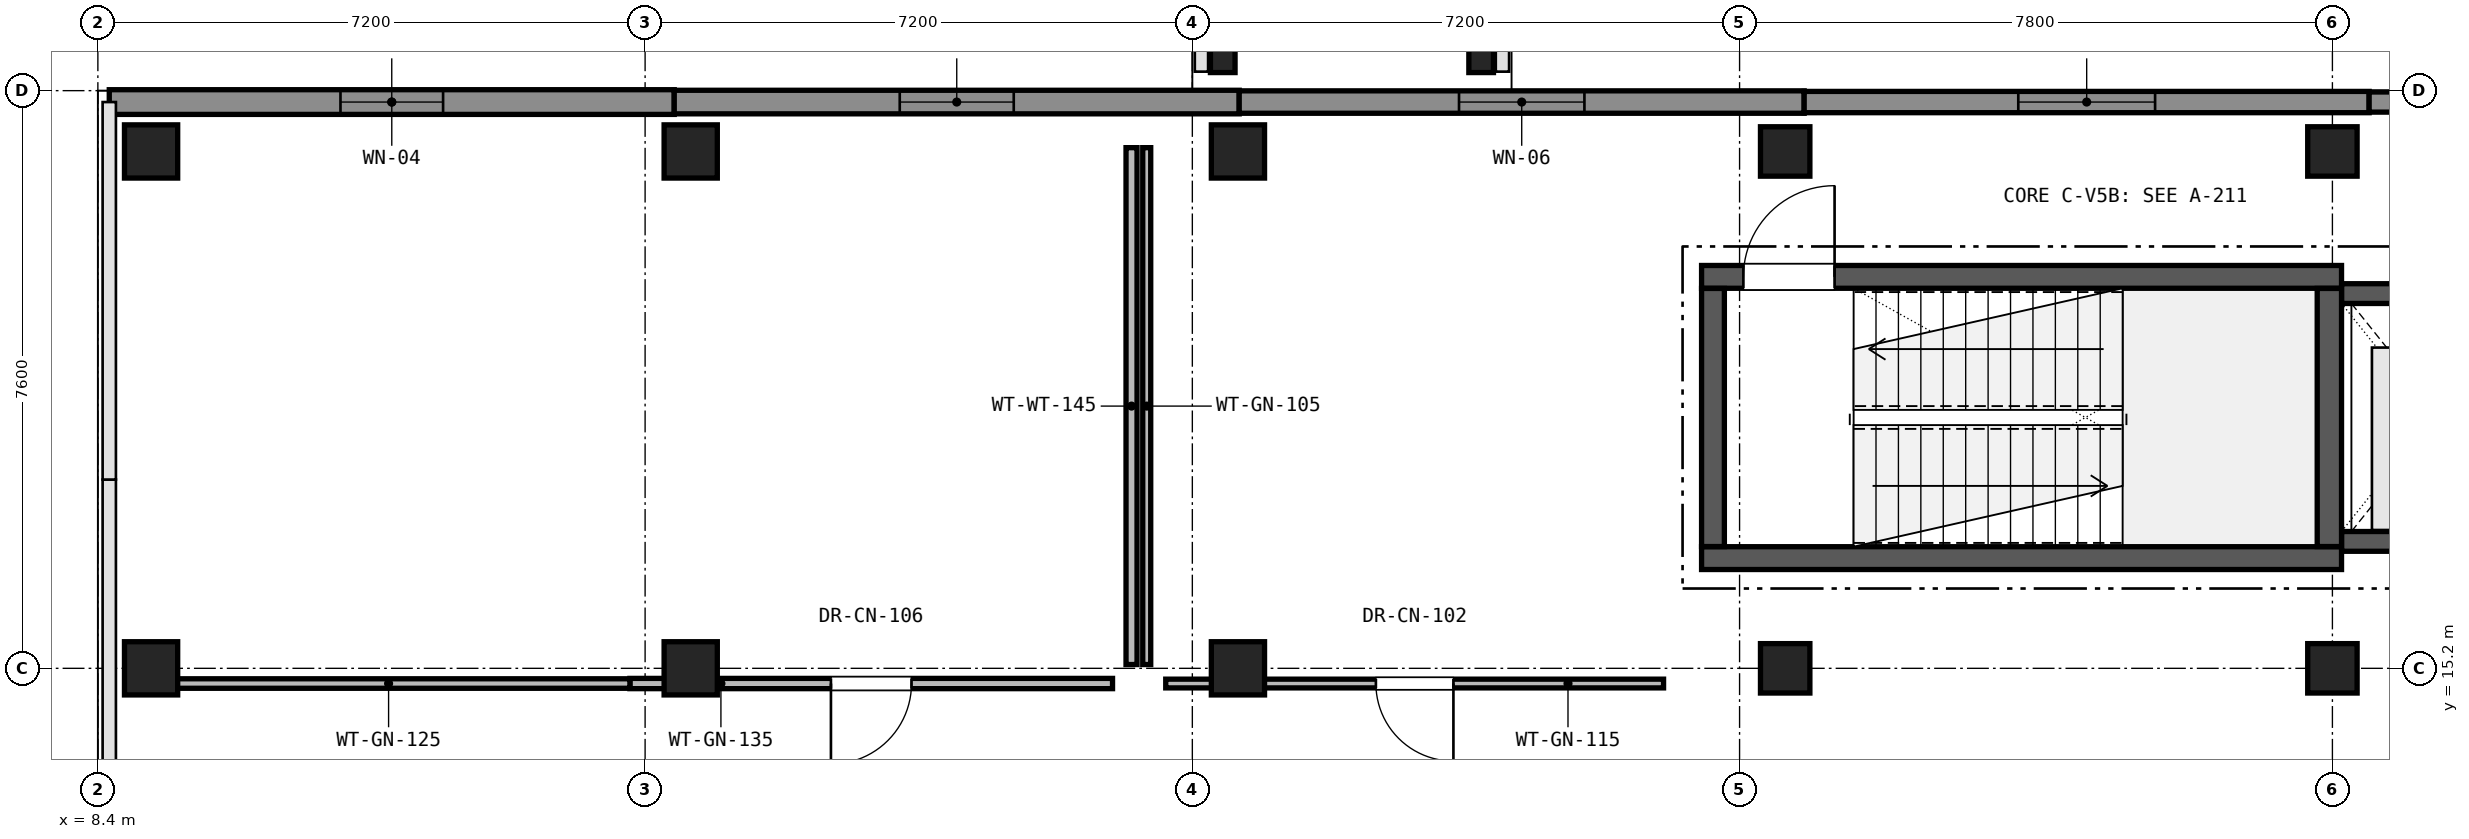
"""IFC4 building model, lengths in metres.
Left out: names, types, materials, properties, quantities, classifications, styles, units other than length and angle.
Written with IfcOpenShell. Run it as: python <this file> out.ifc"""

import sys

from ifc_helpers import new_model, si_unit, direction, frame, frame_2d, origin, origin_2d, place, context, subcontext, project, spatial, rectangle, hollow_circle, extrude, element, fill, save


model = new_model("IFC4")
c1 = context("Model", 3, precision=1e-05, world=origin(), true_north=direction((0.0, 1.0)))
c2 = subcontext(c1, "Body", "Model", "MODEL_VIEW")
j1 = project(units=[si_unit("LENGTHUNIT", "METRE"), si_unit("PLANEANGLEUNIT", "RADIAN")], contexts=[c1])
p1 = place(None, origin())
s1 = spatial("IfcSite", under=j1, at=p1, CompositionType="ELEMENT")
p2 = place(p1, origin())
s2 = spatial("IfcBuilding", under=s1, at=p2, CompositionType="ELEMENT")
p3 = place(p2, frame((0.0, 0.0, 5.1)))
s3 = spatial("IfcBuildingStorey", under=s2, at=p3, CompositionType="ELEMENT", Elevation=5.1)
for number, where, z_axis, x_axis in (
    (1, (9.1, 15.2, 0.0), (0.0, 0.0, 1.0), (1.0, 0.0, 0.0)),
    (2, (9.1, 22.0, 0.0), (0.0, 0.0, 1.0), (1.0, 0.0, 0.0)),
    (3, (16.2, 15.2, 0.0), (0.0, 0.0, 1.0), (1.0, 0.0, 0.0)),
    (4, (16.2, 22.0, 0.0), (0.0, 0.0, 1.0), (1.0, 0.0, 0.0)),
    (5, (23.4, 15.2, 0.0), (0.0, 0.0, 1.0), (1.0, 0.0, 0.0)),
    (6, (23.4, 22.0, 0.0), (0.0, 0.0, 1.0), (1.0, 0.0, 0.0)),
):
    element("IfcColumn", number, at=place(p3, frame(where, z_axis=z_axis, x_axis=x_axis)), inside=s3, PredefinedType="COLUMN", context=c2, shape_type="SweptSolid", body=[
        extrude(rectangle(XDim=0.7, YDim=0.7, at=origin_2d()), origin(), (0.0, 0.0, 1.0), 4.42),
    ])
for number, where, z_axis, x_axis in (
    (7, (30.6, 15.2, 0.0), (0.0, 0.0, 1.0), (1.0, 0.0, 0.0)),
    (8, (30.6, 22.0, 0.0), (0.0, 0.0, 1.0), (1.0, 0.0, 0.0)),
    (9, (37.8, 15.2, 0.0), (0.0, 0.0, 1.0), (1.0, 0.0, 0.0)),
    (10, (37.8, 22.0, 0.0), (0.0, 0.0, 1.0), (1.0, 0.0, 0.0)),
):
    element("IfcColumn", number, at=place(p3, frame(where, z_axis=z_axis, x_axis=x_axis)), inside=s3, PredefinedType="COLUMN", context=c2, shape_type="SweptSolid", body=[
        extrude(rectangle(XDim=0.65, YDim=0.65, at=origin_2d()), origin(), (0.0, 0.0, 1.0), 4.42),
    ])
for number, where, z_axis, x_axis in (
    (11, (23.2, 23.2, 0.0), (0.0, 0.0, 1.0), (1.0, 0.0, 0.0)),
    (12, (26.6, 23.2, 0.0), (0.0, 0.0, 1.0), (1.0, 0.0, 0.0)),
):
    element("IfcColumn", number, at=place(p3, frame(where, z_axis=z_axis, x_axis=x_axis)), inside=s3, PredefinedType="COLUMN", context=c2, shape_type="SweptSolid", body=[
        extrude(hollow_circle(Radius=0.162, WallThickness=0.012, at=origin_2d()), origin(), (0.0, 0.0, 1.0), 4.42),
    ])
p4 = place(p3, frame((8.55, 22.65, 0.0), z_axis=(0.0, 0.0, 1.0), x_axis=(1.0, 0.0, 0.0)))
e13 = element("IfcWall", 13, at=p4, inside=s3, PredefinedType="SOLIDWALL", context=c2, shape_type="SweptSolid", body=[
    extrude(rectangle(XDim=7.433, YDim=0.325, at=frame_2d((3.717, 0.0))), origin(), (0.0, 0.0, 1.0), 4.075),
])
p5 = place(p4, frame((3.042, 0.0, 0.9)))
e14 = element("IfcOpeningElement", 14, at=p5, cuts=e13, PredefinedType="OPENING", context=c2, shape_type="SweptSolid", body=[
    extrude(rectangle(XDim=1.35, YDim=1.5, at=frame_2d((0.675, 0.75))), frame((0.0, 0.172, 0.0), z_axis=(0.0, -1.0, 0.0), x_axis=(1.0, 0.0, 0.0)), (0.0, 0.0, 1.0), 0.345),
])
p6 = place(p3, frame((15.983, 22.65, 0.0), z_axis=(0.0, 0.0, 1.0), x_axis=(1.0, 0.0, 0.0)))
e15 = element("IfcWall", 15, at=p6, inside=s3, PredefinedType="SOLIDWALL", context=c2, shape_type="SweptSolid", body=[
    extrude(rectangle(XDim=7.433, YDim=0.31, at=frame_2d((3.717, 0.0))), origin(), (0.0, 0.0, 1.0), 4.075),
])
p7 = place(p6, frame((2.967, 0.0, 0.9)))
e16 = element("IfcOpeningElement", 16, at=p7, cuts=e15, PredefinedType="OPENING", context=c2, shape_type="SweptSolid", body=[
    extrude(rectangle(XDim=1.5, YDim=1.5, at=frame_2d((0.75, 0.75))), frame((0.0, 0.165, 0.0), z_axis=(0.0, -1.0, 0.0), x_axis=(1.0, 0.0, 0.0)), (0.0, 0.0, 1.0), 0.33),
])
p8 = place(p3, frame((23.417, 22.65, 0.0), z_axis=(0.0, 0.0, 1.0), x_axis=(1.0, 0.0, 0.0)))
e17 = element("IfcWall", 17, at=p8, inside=s3, PredefinedType="SOLIDWALL", context=c2, shape_type="SweptSolid", body=[
    extrude(rectangle(XDim=7.433, YDim=0.295, at=frame_2d((3.717, 0.0))), origin(), (0.0, 0.0, 1.0), 4.075),
])
p9 = place(p8, frame((2.892, 0.0, 0.9)))
e18 = element("IfcOpeningElement", 18, at=p9, cuts=e17, PredefinedType="OPENING", context=c2, shape_type="SweptSolid", body=[
    extrude(rectangle(XDim=1.65, YDim=1.5, at=frame_2d((0.825, 0.75))), frame((0.0, 0.157, 0.0), z_axis=(0.0, -1.0, 0.0), x_axis=(1.0, 0.0, 0.0)), (0.0, 0.0, 1.0), 0.315),
])
p10 = place(p3, frame((30.85, 22.65, 0.0), z_axis=(0.0, 0.0, 1.0), x_axis=(1.0, 0.0, 0.0)))
e19 = element("IfcWall", 19, at=p10, inside=s3, PredefinedType="SOLIDWALL", context=c2, shape_type="SweptSolid", body=[
    extrude(rectangle(XDim=7.433, YDim=0.28, at=frame_2d((3.717, 0.0))), origin(), (0.0, 0.0, 1.0), 4.075),
])
p11 = place(p10, frame((2.817, 0.0, 0.9)))
e20 = element("IfcOpeningElement", 20, at=p11, cuts=e19, PredefinedType="OPENING", context=c2, shape_type="SweptSolid", body=[
    extrude(rectangle(XDim=1.8, YDim=1.5, at=frame_2d((0.9, 0.75))), frame((0.0, 0.15, 0.0), z_axis=(0.0, -1.0, 0.0), x_axis=(1.0, 0.0, 0.0)), (0.0, 0.0, 1.0), 0.3),
])
p12 = place(p3, frame((38.283, 22.65, 0.0), z_axis=(0.0, 0.0, 1.0), x_axis=(1.0, 0.0, 0.0)))
e21 = element("IfcWall", 21, at=p12, inside=s3, PredefinedType="SOLIDWALL", context=c2, shape_type="SweptSolid", body=[
    extrude(rectangle(XDim=7.434, YDim=0.265, at=frame_2d((3.717, 0.0))), origin(), (0.0, 0.0, 1.0), 4.075),
])
p13 = place(p12, frame((2.742, 0.0, 0.9)))
e22 = element("IfcOpeningElement", 22, at=p13, cuts=e21, PredefinedType="OPENING", context=c2, shape_type="SweptSolid", body=[
    extrude(rectangle(XDim=1.95, YDim=1.5, at=frame_2d((0.975, 0.75))), frame((0.0, 0.142, 0.0), z_axis=(0.0, -1.0, 0.0), x_axis=(1.0, 0.0, 0.0)), (0.0, 0.0, 1.0), 0.285),
])
p14 = place(p3, frame((29.5, 16.65, 0.0), z_axis=(0.0, 0.0, 1.0), x_axis=(1.0, 0.0, 0.0)))
e23 = element("IfcWall", 23, at=p14, inside=s3, PredefinedType="SHEAR", context=c2, shape_type="SweptSolid", body=[
    extrude(rectangle(XDim=8.42, YDim=0.3, at=frame_2d((4.21, 0.0))), origin(), (0.0, 0.0, 1.0), 4.075),
])
p15 = place(p3, frame((29.5, 20.35, 0.0), z_axis=(0.0, 0.0, 1.0), x_axis=(1.0, 0.0, 0.0)))
e24 = element("IfcWall", 24, at=p15, inside=s3, PredefinedType="SHEAR", context=c2, shape_type="SweptSolid", body=[
    extrude(rectangle(XDim=8.42, YDim=0.3, at=frame_2d((4.21, 0.0))), origin(), (0.0, 0.0, 1.0), 4.075),
])
p16 = place(p15, frame((0.55, 0.0, 0.0)))
e25 = element("IfcOpeningElement", 25, at=p16, cuts=e24, PredefinedType="OPENING", context=c2, shape_type="SweptSolid", body=[
    extrude(rectangle(XDim=1.2, YDim=2.2, at=frame_2d((0.6, 1.1))), frame((0.0, 0.16, 0.0), z_axis=(0.0, -1.0, 0.0), x_axis=(1.0, 0.0, 0.0)), (0.0, 0.0, 1.0), 0.32),
])
p17 = place(p3, frame((29.65, 16.802, 0.0), z_axis=(0.0, 0.0, 1.0), x_axis=(0.0, 1.0, 0.0)))
e26 = element("IfcWall", 26, at=p17, inside=s3, PredefinedType="SHEAR", context=c2, shape_type="SweptSolid", body=[
    extrude(rectangle(XDim=3.396, YDim=0.3, at=frame_2d((1.698, 0.0))), origin(), (0.0, 0.0, 1.0), 4.075),
])
p18 = place(p3, frame((37.76, 16.802, 0.0), z_axis=(0.0, 0.0, 1.0), x_axis=(0.0, 1.0, 0.0)))
e27 = element("IfcWall", 27, at=p18, inside=s3, PredefinedType="SHEAR", context=c2, shape_type="SweptSolid", body=[
    extrude(rectangle(XDim=3.396, YDim=0.32, at=frame_2d((1.698, 0.0))), origin(), (0.0, 0.0, 1.0), 4.075),
])
p19 = place(p3, frame((37.922, 16.87, 0.0), z_axis=(0.0, 0.0, 1.0), x_axis=(1.0, 0.0, 0.0)))
e28 = element("IfcWall", 28, at=p19, inside=s3, PredefinedType="SHEAR", context=c2, shape_type="SweptSolid", body=[
    extrude(rectangle(XDim=2.658, YDim=0.26, at=frame_2d((1.329, 0.0))), origin(), (0.0, 0.0, 1.0), 4.075),
])
p20 = place(p3, frame((37.922, 20.13, 0.0), z_axis=(0.0, 0.0, 1.0), x_axis=(1.0, 0.0, 0.0)))
e29 = element("IfcWall", 29, at=p20, inside=s3, PredefinedType="SHEAR", context=c2, shape_type="SweptSolid", body=[
    extrude(rectangle(XDim=2.658, YDim=0.26, at=frame_2d((1.329, 0.0))), origin(), (0.0, 0.0, 1.0), 4.075),
])
p21 = place(p20, frame((0.679, 0.0, 0.0)))
e30 = element("IfcOpeningElement", 30, at=p21, cuts=e29, PredefinedType="OPENING", context=c2, shape_type="SweptSolid", body=[
    extrude(rectangle(XDim=1.3, YDim=2.2, at=frame_2d((0.65, 1.1))), frame((0.0, 0.14, 0.0), z_axis=(0.0, -1.0, 0.0), x_axis=(1.0, 0.0, 0.0)), (0.0, 0.0, 1.0), 0.28),
])
p22 = place(p3, frame((22.0, 22.05, 0.0), z_axis=(0.0, 0.0, 1.0), x_axis=(0.0, -1.0, 0.0)))
e31 = element("IfcWall", 31, at=p22, inside=s3, PredefinedType="PARTITIONING", context=c2, shape_type="SweptSolid", body=[
    extrude(rectangle(XDim=6.8, YDim=0.145, at=frame_2d((3.4, 0.0))), origin(), (0.0, 0.0, 1.0), 3.125),
])
p23 = place(p3, frame((21.75, 15.0, 0.0), z_axis=(0.0, 0.0, 1.0), x_axis=(-1.0, 0.0, 0.0)))
e32 = element("IfcWall", 32, at=p23, inside=s3, PredefinedType="PARTITIONING", context=c2, shape_type="SweptSolid", body=[
    extrude(rectangle(XDim=6.35, YDim=0.135, at=frame_2d((3.175, 0.0))), origin(), (0.0, 0.0, 1.0), 3.125),
])
p24 = place(p23, frame((2.645, 0.0, 0.0)))
e33 = element("IfcOpeningElement", 33, at=p24, cuts=e32, PredefinedType="OPENING", context=c2, shape_type="SweptSolid", body=[
    extrude(rectangle(XDim=1.06, YDim=2.15, at=frame_2d((0.53, 1.075))), frame((0.0, 0.077, 0.0), z_axis=(0.0, -1.0, 0.0), x_axis=(1.0, 0.0, 0.0)), (0.0, 0.0, 1.0), 0.155),
])
p25 = place(p3, frame((15.4, 15.0, 0.0), z_axis=(0.0, 0.0, 1.0), x_axis=(-1.0, 0.0, 0.0)))
e34 = element("IfcWall", 34, at=p25, inside=s3, PredefinedType="PARTITIONING", context=c2, shape_type="SweptSolid", body=[
    extrude(rectangle(XDim=6.35, YDim=0.125, at=frame_2d((3.175, 0.0))), origin(), (0.0, 0.0, 1.0), 3.125),
])
p26 = place(p3, frame((29.0, 15.0, 0.0), z_axis=(0.0, 0.0, 1.0), x_axis=(-1.0, 0.0, 0.0)))
e35 = element("IfcWall", 35, at=p26, inside=s3, PredefinedType="PARTITIONING", context=c2, shape_type="SweptSolid", body=[
    extrude(rectangle(XDim=6.55, YDim=0.115, at=frame_2d((3.275, 0.0))), origin(), (0.0, 0.0, 1.0), 3.125),
])
p27 = place(p26, frame((2.765, 0.0, 0.0)))
e36 = element("IfcOpeningElement", 36, at=p27, cuts=e35, PredefinedType="OPENING", context=c2, shape_type="SweptSolid", body=[
    extrude(rectangle(XDim=1.02, YDim=2.15, at=frame_2d((0.51, 1.075))), frame((0.0, 0.067, 0.0), z_axis=(0.0, -1.0, 0.0), x_axis=(1.0, 0.0, 0.0)), (0.0, 0.0, 1.0), 0.135),
])
p28 = place(p3, frame((22.2, 15.25, 0.0), z_axis=(0.0, 0.0, 1.0), x_axis=(0.0, 1.0, 0.0)))
e37 = element("IfcWall", 37, at=p28, inside=s3, PredefinedType="PARTITIONING", context=c2, shape_type="SweptSolid", body=[
    extrude(rectangle(XDim=6.8, YDim=0.105, at=frame_2d((3.4, 0.0))), origin(), (0.0, 0.0, 1.0), 3.125),
])
p29 = place(p5, origin())
e38 = element("IfcWindow", 38, at=p29, inside=s3, PartitioningType="SINGLE_PANEL", PredefinedType="WINDOW", context=c2, shape_type="SweptSolid", body=[
    extrude(rectangle(XDim=1.35, YDim=1.5, at=frame_2d((0.675, 0.75))), frame((0.0, 0.03, 0.0), z_axis=(0.0, -1.0, 0.0), x_axis=(1.0, 0.0, 0.0)), (0.0, 0.0, 1.0), 0.06),
])
fill(e14, e38)
p30 = place(p7, origin())
e39 = element("IfcWindow", 39, at=p30, inside=s3, PartitioningType="SINGLE_PANEL", PredefinedType="WINDOW", context=c2, shape_type="SweptSolid", body=[
    extrude(rectangle(XDim=1.5, YDim=1.5, at=frame_2d((0.75, 0.75))), frame((0.0, 0.03, 0.0), z_axis=(0.0, -1.0, 0.0), x_axis=(1.0, 0.0, 0.0)), (0.0, 0.0, 1.0), 0.06),
])
fill(e16, e39)
p31 = place(p9, origin())
e40 = element("IfcWindow", 40, at=p31, inside=s3, PartitioningType="SINGLE_PANEL", PredefinedType="WINDOW", context=c2, shape_type="SweptSolid", body=[
    extrude(rectangle(XDim=1.65, YDim=1.5, at=frame_2d((0.825, 0.75))), frame((0.0, 0.03, 0.0), z_axis=(0.0, -1.0, 0.0), x_axis=(1.0, 0.0, 0.0)), (0.0, 0.0, 1.0), 0.06),
])
fill(e18, e40)
p32 = place(p11, origin())
e41 = element("IfcWindow", 41, at=p32, inside=s3, PartitioningType="SINGLE_PANEL", PredefinedType="WINDOW", context=c2, shape_type="SweptSolid", body=[
    extrude(rectangle(XDim=1.8, YDim=1.5, at=frame_2d((0.9, 0.75))), frame((0.0, 0.03, 0.0), z_axis=(0.0, -1.0, 0.0), x_axis=(1.0, 0.0, 0.0)), (0.0, 0.0, 1.0), 0.06),
])
fill(e20, e41)
p33 = place(p16, origin())
e42 = element("IfcDoor", 42, at=p33, inside=s3, OperationType="SINGLE_SWING_RIGHT", PredefinedType="DOOR", context=c2, shape_type="SweptSolid", body=[
    extrude(rectangle(XDim=1.2, YDim=2.2, at=frame_2d((0.6, 1.1))), frame((0.0, 0.025, 0.0), z_axis=(0.0, -1.0, 0.0), x_axis=(1.0, 0.0, 0.0)), (0.0, 0.0, 1.0), 0.05),
])
fill(e25, e42)
p34 = place(p24, origin())
e43 = element("IfcDoor", 43, at=p34, inside=s3, OperationType="SINGLE_SWING_RIGHT", PredefinedType="DOOR", context=c2, shape_type="SweptSolid", body=[
    extrude(rectangle(XDim=1.06, YDim=2.15, at=frame_2d((0.53, 1.075))), frame((0.0, 0.025, 0.0), z_axis=(0.0, -1.0, 0.0), x_axis=(1.0, 0.0, 0.0)), (0.0, 0.0, 1.0), 0.05),
])
fill(e33, e43)
p35 = place(p27, origin())
e44 = element("IfcDoor", 44, at=p35, inside=s3, OperationType="SINGLE_SWING_LEFT", PredefinedType="DOOR", context=c2, shape_type="SweptSolid", body=[
    extrude(rectangle(XDim=1.02, YDim=2.15, at=frame_2d((0.51, 1.075))), frame((0.0, 0.025, 0.0), z_axis=(0.0, -1.0, 0.0), x_axis=(1.0, 0.0, 0.0)), (0.0, 0.0, 1.0), 0.05),
])
fill(e36, e44)
save(model, sys.argv[1])
